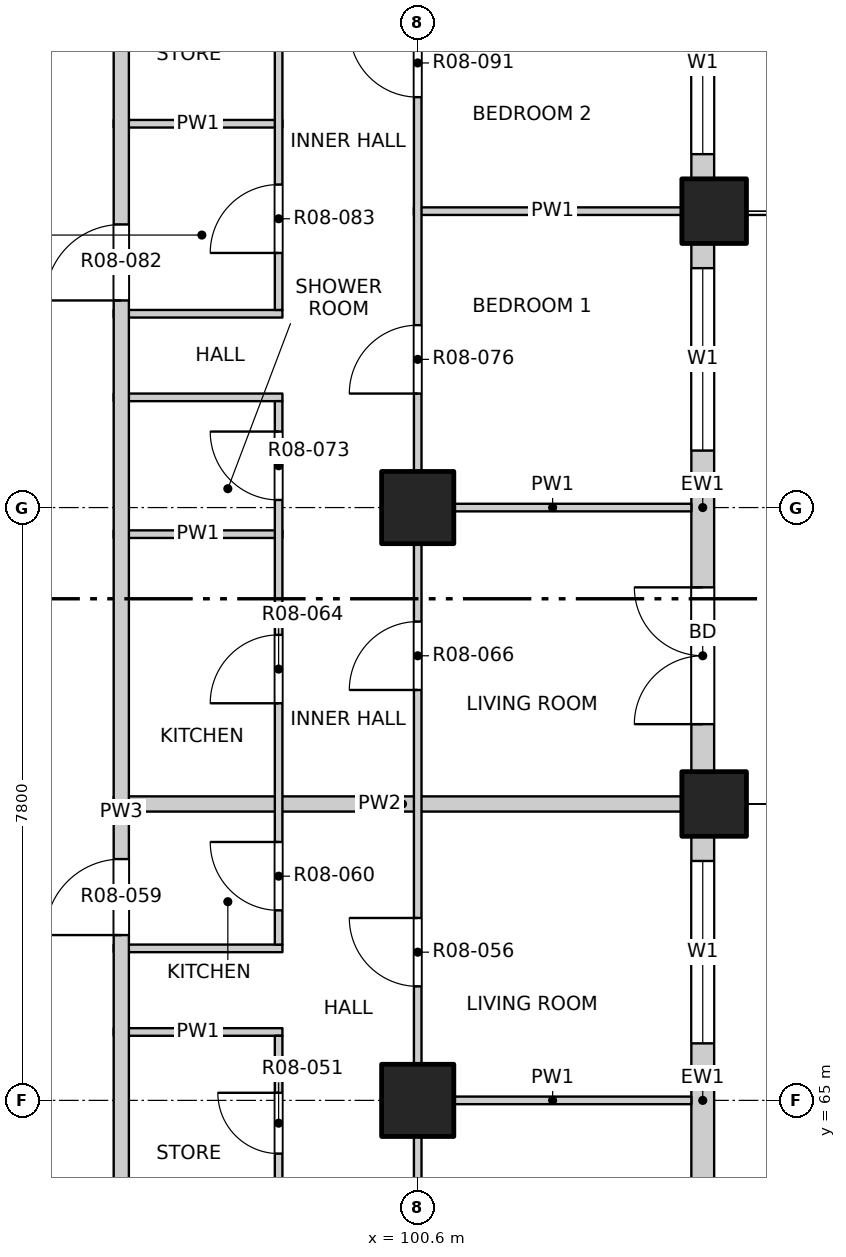
"""IFC4 building model, lengths in metres.
Left out: names, types, materials, properties, quantities, classifications, styles, units other than length and angle.
Written with IfcOpenShell. Run it as: python <this file> out.ifc"""

import sys

from ifc_helpers import new_model, si_unit, direction, frame, frame_2d, origin, origin_2d, place, context, subcontext, project, spatial, rectangle, extrude, element, fill, save


model = new_model("IFC4")
c1 = context("Model", 3, precision=1e-05, world=origin(), true_north=direction((0.0, 1.0)))
c2 = subcontext(c1, "Body", "Model", "MODEL_VIEW")
j1 = project(units=[si_unit("LENGTHUNIT", "METRE"), si_unit("PLANEANGLEUNIT", "RADIAN")], contexts=[c1])
p1 = place(None, origin())
s1 = spatial("IfcSite", under=j1, at=p1, CompositionType="ELEMENT")
p2 = place(p1, origin())
s2 = spatial("IfcBuilding", under=s1, at=p2, CompositionType="ELEMENT")
p3 = place(p2, frame((0.0, 0.0, 99.9)))
s3 = spatial("IfcBuildingStorey", under=s2, at=p3, CompositionType="ELEMENT", Elevation=99.9)
for number, where, z_axis, x_axis in (
    (1, (104.5, 68.9, -0.3), (0.0, 0.0, 1.0), (1.0, 0.0, 0.0)),
    (2, (104.5, 76.7, -0.3), (0.0, 0.0, 1.0), (1.0, 0.0, 0.0)),
):
    element("IfcColumn", number, at=place(p3, frame(where, z_axis=z_axis, x_axis=x_axis)), inside=s3, PredefinedType="COLUMN", context=c2, shape_type="SweptSolid", body=[
        extrude(rectangle(XDim=0.85, YDim=0.85, at=origin_2d()), origin(), (0.0, 0.0, 1.0), 3.45),
    ])
for number, where, z_axis, x_axis in (
    (3, (100.6, 65.0, -0.3), (0.0, 0.0, 1.0), (1.0, 0.0, 0.0)),
    (4, (100.6, 72.8, -0.3), (0.0, 0.0, 1.0), (1.0, 0.0, 0.0)),
):
    element("IfcColumn", number, at=place(p3, frame(where, z_axis=z_axis, x_axis=x_axis)), inside=s3, PredefinedType="COLUMN", context=c2, shape_type="SweptSolid", body=[
        extrude(rectangle(XDim=0.95, YDim=0.95, at=origin_2d()), origin(), (0.0, 0.0, 1.0), 3.45),
    ])
p4 = place(p3, frame((104.35, 61.525, 0.0), z_axis=(0.0, 0.0, 1.0), x_axis=(0.0, 1.0, 0.0)))
e5 = element("IfcWall", 5, at=p4, inside=s3, PredefinedType="SOLIDWALL", context=c2, shape_type="SweptSolid", body=[
    extrude(rectangle(XDim=6.95, YDim=0.3, at=frame_2d((3.475, 0.0))), origin(), (0.0, 0.0, 1.0), 2.7),
])
p5 = place(p4, frame((0.625, 0.0, 0.0)))
e6 = element("IfcOpeningElement", 6, at=p5, cuts=e5, PredefinedType="OPENING", context=c2, shape_type="SweptSolid", body=[
    extrude(rectangle(XDim=1.8, YDim=2.4, at=frame_2d((0.9, 1.2))), frame((0.0, 0.16, 0.0), z_axis=(0.0, -1.0, 0.0), x_axis=(1.0, 0.0, 0.0)), (0.0, 0.0, 1.0), 0.32),
])
p6 = place(p4, frame((4.225, 0.0, 0.9)))
e7 = element("IfcOpeningElement", 7, at=p6, cuts=e5, PredefinedType="OPENING", context=c2, shape_type="SweptSolid", body=[
    extrude(rectangle(XDim=2.4, YDim=1.8, at=frame_2d((1.2, 0.9))), frame((0.0, 0.16, 0.0), z_axis=(0.0, -1.0, 0.0), x_axis=(1.0, 0.0, 0.0)), (0.0, 0.0, 1.0), 0.32),
])
p7 = place(p3, frame((104.35, 69.325, 0.0), z_axis=(0.0, 0.0, 1.0), x_axis=(0.0, 1.0, 0.0)))
e8 = element("IfcWall", 8, at=p7, inside=s3, PredefinedType="SOLIDWALL", context=c2, shape_type="SweptSolid", body=[
    extrude(rectangle(XDim=6.95, YDim=0.3, at=frame_2d((3.475, 0.0))), origin(), (0.0, 0.0, 1.0), 2.7),
])
p8 = place(p7, frame((0.625, 0.0, 0.0)))
e9 = element("IfcOpeningElement", 9, at=p8, cuts=e8, PredefinedType="OPENING", context=c2, shape_type="SweptSolid", body=[
    extrude(rectangle(XDim=1.8, YDim=2.4, at=frame_2d((0.9, 1.2))), frame((0.0, 0.16, 0.0), z_axis=(0.0, -1.0, 0.0), x_axis=(1.0, 0.0, 0.0)), (0.0, 0.0, 1.0), 0.32),
])
p9 = place(p7, frame((4.225, 0.0, 0.9)))
e10 = element("IfcOpeningElement", 10, at=p9, cuts=e8, PredefinedType="OPENING", context=c2, shape_type="SweptSolid", body=[
    extrude(rectangle(XDim=2.4, YDim=1.8, at=frame_2d((1.2, 0.9))), frame((0.0, 0.16, 0.0), z_axis=(0.0, -1.0, 0.0), x_axis=(1.0, 0.0, 0.0)), (0.0, 0.0, 1.0), 0.32),
])
p10 = place(p3, frame((104.35, 77.125, 0.0), z_axis=(0.0, 0.0, 1.0), x_axis=(0.0, 1.0, 0.0)))
e11 = element("IfcWall", 11, at=p10, inside=s3, PredefinedType="SOLIDWALL", context=c2, shape_type="SweptSolid", body=[
    extrude(rectangle(XDim=3.475, YDim=0.3, at=frame_2d((1.738, 0.0))), origin(), (0.0, 0.0, 1.0), 2.7),
])
p11 = place(p10, frame((0.325, 0.0, 0.9)))
e12 = element("IfcOpeningElement", 12, at=p11, cuts=e11, PredefinedType="OPENING", context=c2, shape_type="SweptSolid", body=[
    extrude(rectangle(XDim=2.4, YDim=1.8, at=frame_2d((1.2, 0.9))), frame((0.0, 0.16, 0.0), z_axis=(0.0, -1.0, 0.0), x_axis=(1.0, 0.0, 0.0)), (0.0, 0.0, 1.0), 0.32),
])
p12 = place(p3, frame((100.55, 65.0, 0.0), z_axis=(0.0, 0.0, 1.0), x_axis=(1.0, 0.0, 0.0)))
e13 = element("IfcWall", 13, at=p12, inside=s3, PredefinedType="PARTITIONING", context=c2, shape_type="SweptSolid", body=[
    extrude(rectangle(XDim=3.65, YDim=0.1, at=frame_2d((1.825, 0.0))), origin(), (0.0, 0.0, 1.0), 3.15),
])
for number, where, z_axis, x_axis in (
    (14, (96.6, 65.9, 0.0), (0.0, 0.0, 1.0), (1.0, 0.0, 0.0)),
    (15, (96.6, 67.0, 0.0), (0.0, 0.0, 1.0), (1.0, 0.0, 0.0)),
):
    element("IfcWall", number, at=place(p3, frame(where, z_axis=z_axis, x_axis=x_axis)), inside=s3, PredefinedType="PARTITIONING", context=c2, shape_type="SweptSolid", body=[
        extrude(rectangle(XDim=2.22, YDim=0.1, at=frame_2d((1.11, 0.0))), origin(), (0.0, 0.0, 1.0), 3.15),
    ])
p13 = place(p3, frame((96.6, 68.9, 0.0), z_axis=(0.0, 0.0, 1.0), x_axis=(1.0, 0.0, 0.0)))
e16 = element("IfcWall", 16, at=p13, inside=s3, PredefinedType="PARTITIONING", context=c2, shape_type="SweptSolid", body=[
    extrude(rectangle(XDim=7.6, YDim=0.2, at=frame_2d((3.8, 0.0))), origin(), (0.0, 0.0, 1.0), 2.55),
])
p14 = place(p3, frame((96.6, 72.45, 0.0), z_axis=(0.0, 0.0, 1.0), x_axis=(1.0, 0.0, 0.0)))
e17 = element("IfcWall", 17, at=p14, inside=s3, PredefinedType="PARTITIONING", context=c2, shape_type="SweptSolid", body=[
    extrude(rectangle(XDim=2.22, YDim=0.1, at=frame_2d((1.11, 0.0))), origin(), (0.0, 0.0, 1.0), 3.15),
])
p15 = place(p3, frame((100.55, 72.8, 0.0), z_axis=(0.0, 0.0, 1.0), x_axis=(1.0, 0.0, 0.0)))
e18 = element("IfcWall", 18, at=p15, inside=s3, PredefinedType="PARTITIONING", context=c2, shape_type="SweptSolid", body=[
    extrude(rectangle(XDim=3.65, YDim=0.1, at=frame_2d((1.825, 0.0))), origin(), (0.0, 0.0, 1.0), 3.15),
])
for number, where, z_axis, x_axis in (
    (19, (96.6, 74.25, 0.0), (0.0, 0.0, 1.0), (1.0, 0.0, 0.0)),
    (20, (96.6, 75.35, 0.0), (0.0, 0.0, 1.0), (1.0, 0.0, 0.0)),
):
    element("IfcWall", number, at=place(p3, frame(where, z_axis=z_axis, x_axis=x_axis)), inside=s3, PredefinedType="PARTITIONING", context=c2, shape_type="SweptSolid", body=[
        extrude(rectangle(XDim=2.22, YDim=0.1, at=frame_2d((1.11, 0.0))), origin(), (0.0, 0.0, 1.0), 3.15),
    ])
p16 = place(p3, frame((100.55, 76.7, 0.0), z_axis=(0.0, 0.0, 1.0), x_axis=(1.0, 0.0, 0.0)))
e21 = element("IfcWall", 21, at=p16, inside=s3, PredefinedType="PARTITIONING", context=c2, shape_type="SweptSolid", body=[
    extrude(rectangle(XDim=3.65, YDim=0.1, at=frame_2d((1.825, 0.0))), origin(), (0.0, 0.0, 1.0), 2.55),
])
p17 = place(p3, frame((96.6, 77.85, 0.0), z_axis=(0.0, 0.0, 1.0), x_axis=(1.0, 0.0, 0.0)))
e22 = element("IfcWall", 22, at=p17, inside=s3, PredefinedType="PARTITIONING", context=c2, shape_type="SweptSolid", body=[
    extrude(rectangle(XDim=2.22, YDim=0.1, at=frame_2d((1.11, 0.0))), origin(), (0.0, 0.0, 1.0), 3.15),
])
p18 = place(p3, frame((96.7, 53.4, 0.0), z_axis=(0.0, 0.0, 1.0), x_axis=(0.0, 1.0, 0.0)))
e23 = element("IfcWall", 23, at=p18, inside=s3, PredefinedType="PARTITIONING", context=c2, shape_type="SweptSolid", body=[
    extrude(rectangle(XDim=30.8, YDim=0.2, at=frame_2d((15.4, 0.0))), origin(), (0.0, 0.0, 1.0), 3.15),
])
p19 = place(p18, frame((5.525, 0.0, 0.0)))
e24 = element("IfcOpeningElement", 24, at=p19, cuts=e23, PredefinedType="OPENING", context=c2, shape_type="SweptSolid", body=[
    extrude(rectangle(XDim=1.0, YDim=2.1, at=frame_2d((0.5, 1.05))), frame((0.0, 0.11, 0.0), z_axis=(0.0, -1.0, 0.0), x_axis=(1.0, 0.0, 0.0)), (0.0, 0.0, 1.0), 0.22),
])
p20 = place(p18, frame((13.775, 0.0, 0.0)))
e25 = element("IfcOpeningElement", 25, at=p20, cuts=e23, PredefinedType="OPENING", context=c2, shape_type="SweptSolid", body=[
    extrude(rectangle(XDim=1.0, YDim=2.1, at=frame_2d((0.5, 1.05))), frame((0.0, 0.11, 0.0), z_axis=(0.0, -1.0, 0.0), x_axis=(1.0, 0.0, 0.0)), (0.0, 0.0, 1.0), 0.22),
])
p21 = place(p18, frame((22.125, 0.0, 0.0)))
e26 = element("IfcOpeningElement", 26, at=p21, cuts=e23, PredefinedType="OPENING", context=c2, shape_type="SweptSolid", body=[
    extrude(rectangle(XDim=1.0, YDim=2.1, at=frame_2d((0.5, 1.05))), frame((0.0, 0.11, 0.0), z_axis=(0.0, -1.0, 0.0), x_axis=(1.0, 0.0, 0.0)), (0.0, 0.0, 1.0), 0.22),
])
p22 = place(p3, frame((98.77, 58.8, 0.0), z_axis=(0.0, 0.0, 1.0), x_axis=(0.0, 1.0, 0.0)))
e27 = element("IfcWall", 27, at=p22, inside=s3, PredefinedType="PARTITIONING", context=c2, shape_type="SweptSolid", body=[
    extrude(rectangle(XDim=7.05, YDim=0.1, at=frame_2d((3.525, 0.0))), origin(), (0.0, 0.0, 1.0), 3.15),
])
p23 = place(p22, frame((0.675, 0.0, 0.0)))
e28 = element("IfcOpeningElement", 28, at=p23, cuts=e27, PredefinedType="OPENING", context=c2, shape_type="SweptSolid", body=[
    extrude(rectangle(XDim=0.9, YDim=2.1, at=frame_2d((0.45, 1.05))), frame((0.0, 0.06, 0.0), z_axis=(0.0, -1.0, 0.0), x_axis=(1.0, 0.0, 0.0)), (0.0, 0.0, 1.0), 0.12),
])
p24 = place(p22, frame((3.05, 0.0, 0.0)))
e29 = element("IfcOpeningElement", 29, at=p24, cuts=e27, PredefinedType="OPENING", context=c2, shape_type="SweptSolid", body=[
    extrude(rectangle(XDim=0.9, YDim=2.1, at=frame_2d((0.45, 1.05))), frame((0.0, 0.06, 0.0), z_axis=(0.0, -1.0, 0.0), x_axis=(1.0, 0.0, 0.0)), (0.0, 0.0, 1.0), 0.12),
])
p25 = place(p22, frame((5.5, 0.0, 0.0)))
e30 = element("IfcOpeningElement", 30, at=p25, cuts=e27, PredefinedType="OPENING", context=c2, shape_type="SweptSolid", body=[
    extrude(rectangle(XDim=0.8, YDim=2.1, at=frame_2d((0.4, 1.05))), frame((0.0, 0.06, 0.0), z_axis=(0.0, -1.0, 0.0), x_axis=(1.0, 0.0, 0.0)), (0.0, 0.0, 1.0), 0.12),
])
p26 = place(p3, frame((98.77, 67.05, 0.0), z_axis=(0.0, 0.0, 1.0), x_axis=(0.0, 1.0, 0.0)))
e31 = element("IfcWall", 31, at=p26, inside=s3, PredefinedType="PARTITIONING", context=c2, shape_type="SweptSolid", body=[
    extrude(rectangle(XDim=7.15, YDim=0.1, at=frame_2d((3.575, 0.0))), origin(), (0.0, 0.0, 1.0), 3.15),
])
p27 = place(p26, frame((0.45, 0.0, 0.0)))
e32 = element("IfcOpeningElement", 32, at=p27, cuts=e31, PredefinedType="OPENING", context=c2, shape_type="SweptSolid", body=[
    extrude(rectangle(XDim=0.9, YDim=2.1, at=frame_2d((0.45, 1.05))), frame((0.0, 0.06, 0.0), z_axis=(0.0, -1.0, 0.0), x_axis=(1.0, 0.0, 0.0)), (0.0, 0.0, 1.0), 0.12),
])
p28 = place(p26, frame((3.175, 0.0, 0.0)))
e33 = element("IfcOpeningElement", 33, at=p28, cuts=e31, PredefinedType="OPENING", context=c2, shape_type="SweptSolid", body=[
    extrude(rectangle(XDim=0.9, YDim=2.1, at=frame_2d((0.45, 1.05))), frame((0.0, 0.06, 0.0), z_axis=(0.0, -1.0, 0.0), x_axis=(1.0, 0.0, 0.0)), (0.0, 0.0, 1.0), 0.12),
])
p29 = place(p26, frame((5.85, 0.0, 0.0)))
e34 = element("IfcOpeningElement", 34, at=p29, cuts=e31, PredefinedType="OPENING", context=c2, shape_type="SweptSolid", body=[
    extrude(rectangle(XDim=0.9, YDim=2.1, at=frame_2d((0.45, 1.05))), frame((0.0, 0.06, 0.0), z_axis=(0.0, -1.0, 0.0), x_axis=(1.0, 0.0, 0.0)), (0.0, 0.0, 1.0), 0.12),
])
p30 = place(p3, frame((98.77, 75.4, 0.0), z_axis=(0.0, 0.0, 1.0), x_axis=(0.0, 1.0, 0.0)))
e35 = element("IfcWall", 35, at=p30, inside=s3, PredefinedType="PARTITIONING", context=c2, shape_type="SweptSolid", body=[
    extrude(rectangle(XDim=5.15, YDim=0.1, at=frame_2d((2.575, 0.0))), origin(), (0.0, 0.0, 1.0), 3.15),
])
p31 = place(p30, frame((0.75, 0.0, 0.0)))
e36 = element("IfcOpeningElement", 36, at=p31, cuts=e35, PredefinedType="OPENING", context=c2, shape_type="SweptSolid", body=[
    extrude(rectangle(XDim=0.9, YDim=2.1, at=frame_2d((0.45, 1.05))), frame((0.0, 0.06, 0.0), z_axis=(0.0, -1.0, 0.0), x_axis=(1.0, 0.0, 0.0)), (0.0, 0.0, 1.0), 0.12),
])
p32 = place(p30, frame((3.425, 0.0, 0.0)))
e37 = element("IfcOpeningElement", 37, at=p32, cuts=e35, PredefinedType="OPENING", context=c2, shape_type="SweptSolid", body=[
    extrude(rectangle(XDim=0.8, YDim=2.1, at=frame_2d((0.4, 1.05))), frame((0.0, 0.06, 0.0), z_axis=(0.0, -1.0, 0.0), x_axis=(1.0, 0.0, 0.0)), (0.0, 0.0, 1.0), 0.12),
])
p33 = place(p3, frame((100.6, 45.8, 0.0), z_axis=(0.0, 0.0, 1.0), x_axis=(0.0, 1.0, 0.0)))
e38 = element("IfcWall", 38, at=p33, inside=s3, PredefinedType="PARTITIONING", context=c2, shape_type="SweptSolid", body=[
    extrude(rectangle(XDim=38.4, YDim=0.1, at=frame_2d((19.2, 0.0))), origin(), (0.0, 0.0, 1.0), 3.15),
])
p34 = place(p33, frame((1.05, 0.0, 0.0)))
e39 = element("IfcOpeningElement", 39, at=p34, cuts=e38, PredefinedType="OPENING", context=c2, shape_type="SweptSolid", body=[
    extrude(rectangle(XDim=1.2, YDim=2.1, at=frame_2d((0.6, 1.05))), frame((0.0, 0.06, 0.0), z_axis=(0.0, -1.0, 0.0), x_axis=(1.0, 0.0, 0.0)), (0.0, 0.0, 1.0), 0.12),
])
p35 = place(p33, frame((5.1, 0.0, 0.0)))
e40 = element("IfcOpeningElement", 40, at=p35, cuts=e38, PredefinedType="OPENING", context=c2, shape_type="SweptSolid", body=[
    extrude(rectangle(XDim=0.9, YDim=2.1, at=frame_2d((0.45, 1.05))), frame((0.0, 0.06, 0.0), z_axis=(0.0, -1.0, 0.0), x_axis=(1.0, 0.0, 0.0)), (0.0, 0.0, 1.0), 0.12),
])
p36 = place(p33, frame((9.0, 0.0, 0.0)))
e41 = element("IfcOpeningElement", 41, at=p36, cuts=e38, PredefinedType="OPENING", context=c2, shape_type="SweptSolid", body=[
    extrude(rectangle(XDim=0.9, YDim=2.1, at=frame_2d((0.45, 1.05))), frame((0.0, 0.06, 0.0), z_axis=(0.0, -1.0, 0.0), x_axis=(1.0, 0.0, 0.0)), (0.0, 0.0, 1.0), 0.12),
])
p37 = place(p33, frame((12.9, 0.0, 0.0)))
e42 = element("IfcOpeningElement", 42, at=p37, cuts=e38, PredefinedType="OPENING", context=c2, shape_type="SweptSolid", body=[
    extrude(rectangle(XDim=0.9, YDim=2.1, at=frame_2d((0.45, 1.05))), frame((0.0, 0.06, 0.0), z_axis=(0.0, -1.0, 0.0), x_axis=(1.0, 0.0, 0.0)), (0.0, 0.0, 1.0), 0.12),
])
p38 = place(p33, frame((16.8, 0.0, 0.0)))
e43 = element("IfcOpeningElement", 43, at=p38, cuts=e38, PredefinedType="OPENING", context=c2, shape_type="SweptSolid", body=[
    extrude(rectangle(XDim=0.9, YDim=2.1, at=frame_2d((0.45, 1.05))), frame((0.0, 0.06, 0.0), z_axis=(0.0, -1.0, 0.0), x_axis=(1.0, 0.0, 0.0)), (0.0, 0.0, 1.0), 0.12),
])
p39 = place(p33, frame((20.7, 0.0, 0.0)))
e44 = element("IfcOpeningElement", 44, at=p39, cuts=e38, PredefinedType="OPENING", context=c2, shape_type="SweptSolid", body=[
    extrude(rectangle(XDim=0.9, YDim=2.1, at=frame_2d((0.45, 1.05))), frame((0.0, 0.06, 0.0), z_axis=(0.0, -1.0, 0.0), x_axis=(1.0, 0.0, 0.0)), (0.0, 0.0, 1.0), 0.12),
])
p40 = place(p33, frame((24.6, 0.0, 0.0)))
e45 = element("IfcOpeningElement", 45, at=p40, cuts=e38, PredefinedType="OPENING", context=c2, shape_type="SweptSolid", body=[
    extrude(rectangle(XDim=0.9, YDim=2.1, at=frame_2d((0.45, 1.05))), frame((0.0, 0.06, 0.0), z_axis=(0.0, -1.0, 0.0), x_axis=(1.0, 0.0, 0.0)), (0.0, 0.0, 1.0), 0.12),
])
p41 = place(p33, frame((28.5, 0.0, 0.0)))
e46 = element("IfcOpeningElement", 46, at=p41, cuts=e38, PredefinedType="OPENING", context=c2, shape_type="SweptSolid", body=[
    extrude(rectangle(XDim=0.9, YDim=2.1, at=frame_2d((0.45, 1.05))), frame((0.0, 0.06, 0.0), z_axis=(0.0, -1.0, 0.0), x_axis=(1.0, 0.0, 0.0)), (0.0, 0.0, 1.0), 0.12),
])
p42 = place(p33, frame((32.4, 0.0, 0.0)))
e47 = element("IfcOpeningElement", 47, at=p42, cuts=e38, PredefinedType="OPENING", context=c2, shape_type="SweptSolid", body=[
    extrude(rectangle(XDim=0.9, YDim=2.1, at=frame_2d((0.45, 1.05))), frame((0.0, 0.06, 0.0), z_axis=(0.0, -1.0, 0.0), x_axis=(1.0, 0.0, 0.0)), (0.0, 0.0, 1.0), 0.12),
])
p43 = place(p33, frame((36.15, 0.0, 0.0)))
e48 = element("IfcOpeningElement", 48, at=p43, cuts=e38, PredefinedType="OPENING", context=c2, shape_type="SweptSolid", body=[
    extrude(rectangle(XDim=1.2, YDim=2.1, at=frame_2d((0.6, 1.05))), frame((0.0, 0.06, 0.0), z_axis=(0.0, -1.0, 0.0), x_axis=(1.0, 0.0, 0.0)), (0.0, 0.0, 1.0), 0.12),
])
p44 = place(p6, origin())
e49 = element("IfcWindow", 49, at=p44, inside=s3, PartitioningType="DOUBLE_PANEL_VERTICAL", PredefinedType="WINDOW", context=c2, shape_type="SweptSolid", body=[
    extrude(rectangle(XDim=2.4, YDim=1.8, at=frame_2d((1.2, 0.9))), frame((0.0, 0.03, 0.0), z_axis=(0.0, -1.0, 0.0), x_axis=(1.0, 0.0, 0.0)), (0.0, 0.0, 1.0), 0.06),
])
fill(e7, e49)
p45 = place(p8, origin())
e50 = element("IfcDoor", 50, at=p45, inside=s3, OperationType="DOUBLE_DOOR_SINGLE_SWING", PredefinedType="DOOR", context=c2, shape_type="SweptSolid", body=[
    extrude(rectangle(XDim=1.8, YDim=2.4, at=frame_2d((0.9, 1.2))), frame((0.0, 0.025, 0.0), z_axis=(0.0, -1.0, 0.0), x_axis=(1.0, 0.0, 0.0)), (0.0, 0.0, 1.0), 0.05),
])
fill(e9, e50)
p46 = place(p9, origin())
e51 = element("IfcWindow", 51, at=p46, inside=s3, PartitioningType="DOUBLE_PANEL_VERTICAL", PredefinedType="WINDOW", context=c2, shape_type="SweptSolid", body=[
    extrude(rectangle(XDim=2.4, YDim=1.8, at=frame_2d((1.2, 0.9))), frame((0.0, 0.03, 0.0), z_axis=(0.0, -1.0, 0.0), x_axis=(1.0, 0.0, 0.0)), (0.0, 0.0, 1.0), 0.06),
])
fill(e10, e51)
p47 = place(p11, origin())
e52 = element("IfcWindow", 52, at=p47, inside=s3, PartitioningType="DOUBLE_PANEL_VERTICAL", PredefinedType="WINDOW", context=c2, shape_type="SweptSolid", body=[
    extrude(rectangle(XDim=2.4, YDim=1.8, at=frame_2d((1.2, 0.9))), frame((0.0, 0.03, 0.0), z_axis=(0.0, -1.0, 0.0), x_axis=(1.0, 0.0, 0.0)), (0.0, 0.0, 1.0), 0.06),
])
fill(e12, e52)
p48 = place(p25, origin())
e53 = element("IfcDoor", 53, at=p48, inside=s3, OperationType="SINGLE_SWING_RIGHT", PredefinedType="DOOR", context=c2, shape_type="SweptSolid", body=[
    extrude(rectangle(XDim=0.8, YDim=2.1, at=frame_2d((0.4, 1.05))), frame((0.0, 0.025, 0.0), z_axis=(0.0, -1.0, 0.0), x_axis=(1.0, 0.0, 0.0)), (0.0, 0.0, 1.0), 0.05),
])
fill(e30, e53)
p49 = place(p39, origin())
e54 = element("IfcDoor", 54, at=p49, inside=s3, OperationType="SINGLE_SWING_RIGHT", PredefinedType="DOOR", context=c2, shape_type="SweptSolid", body=[
    extrude(rectangle(XDim=0.9, YDim=2.1, at=frame_2d((0.45, 1.05))), frame((0.0, 0.025, 0.0), z_axis=(0.0, -1.0, 0.0), x_axis=(1.0, 0.0, 0.0)), (0.0, 0.0, 1.0), 0.05),
])
fill(e44, e54)
p50 = place(p20, origin())
e55 = element("IfcDoor", 55, at=p50, inside=s3, OperationType="SINGLE_SWING_LEFT", PredefinedType="DOOR", context=c2, shape_type="SweptSolid", body=[
    extrude(rectangle(XDim=1.0, YDim=2.1, at=frame_2d((0.5, 1.05))), frame((0.0, 0.025, 0.0), z_axis=(0.0, -1.0, 0.0), x_axis=(1.0, 0.0, 0.0)), (0.0, 0.0, 1.0), 0.05),
])
fill(e25, e55)
p51 = place(p27, origin())
e56 = element("IfcDoor", 56, at=p51, inside=s3, OperationType="SINGLE_SWING_RIGHT", PredefinedType="DOOR", context=c2, shape_type="SweptSolid", body=[
    extrude(rectangle(XDim=0.9, YDim=2.1, at=frame_2d((0.45, 1.05))), frame((0.0, 0.025, 0.0), z_axis=(0.0, -1.0, 0.0), x_axis=(1.0, 0.0, 0.0)), (0.0, 0.0, 1.0), 0.05),
])
fill(e32, e56)
p52 = place(p28, origin())
e57 = element("IfcDoor", 57, at=p52, inside=s3, OperationType="SINGLE_SWING_LEFT", PredefinedType="DOOR", context=c2, shape_type="SweptSolid", body=[
    extrude(rectangle(XDim=0.9, YDim=2.1, at=frame_2d((0.45, 1.05))), frame((0.0, 0.025, 0.0), z_axis=(0.0, -1.0, 0.0), x_axis=(1.0, 0.0, 0.0)), (0.0, 0.0, 1.0), 0.05),
])
fill(e33, e57)
p53 = place(p40, origin())
e58 = element("IfcDoor", 58, at=p53, inside=s3, OperationType="SINGLE_SWING_LEFT", PredefinedType="DOOR", context=c2, shape_type="SweptSolid", body=[
    extrude(rectangle(XDim=0.9, YDim=2.1, at=frame_2d((0.45, 1.05))), frame((0.0, 0.025, 0.0), z_axis=(0.0, -1.0, 0.0), x_axis=(1.0, 0.0, 0.0)), (0.0, 0.0, 1.0), 0.05),
])
fill(e45, e58)
p54 = place(p29, origin())
e59 = element("IfcDoor", 59, at=p54, inside=s3, OperationType="SINGLE_SWING_RIGHT", PredefinedType="DOOR", context=c2, shape_type="SweptSolid", body=[
    extrude(rectangle(XDim=0.9, YDim=2.1, at=frame_2d((0.45, 1.05))), frame((0.0, 0.025, 0.0), z_axis=(0.0, -1.0, 0.0), x_axis=(1.0, 0.0, 0.0)), (0.0, 0.0, 1.0), 0.05),
])
fill(e34, e59)
p55 = place(p41, origin())
e60 = element("IfcDoor", 60, at=p55, inside=s3, OperationType="SINGLE_SWING_LEFT", PredefinedType="DOOR", context=c2, shape_type="SweptSolid", body=[
    extrude(rectangle(XDim=0.9, YDim=2.1, at=frame_2d((0.45, 1.05))), frame((0.0, 0.025, 0.0), z_axis=(0.0, -1.0, 0.0), x_axis=(1.0, 0.0, 0.0)), (0.0, 0.0, 1.0), 0.05),
])
fill(e46, e60)
p56 = place(p21, origin())
e61 = element("IfcDoor", 61, at=p56, inside=s3, OperationType="SINGLE_SWING_LEFT", PredefinedType="DOOR", context=c2, shape_type="SweptSolid", body=[
    extrude(rectangle(XDim=1.0, YDim=2.1, at=frame_2d((0.5, 1.05))), frame((0.0, 0.025, 0.0), z_axis=(0.0, -1.0, 0.0), x_axis=(1.0, 0.0, 0.0)), (0.0, 0.0, 1.0), 0.05),
])
fill(e26, e61)
p57 = place(p31, origin())
e62 = element("IfcDoor", 62, at=p57, inside=s3, OperationType="SINGLE_SWING_LEFT", PredefinedType="DOOR", context=c2, shape_type="SweptSolid", body=[
    extrude(rectangle(XDim=0.9, YDim=2.1, at=frame_2d((0.45, 1.05))), frame((0.0, 0.025, 0.0), z_axis=(0.0, -1.0, 0.0), x_axis=(1.0, 0.0, 0.0)), (0.0, 0.0, 1.0), 0.05),
])
fill(e36, e62)
p58 = place(p42, origin())
e63 = element("IfcDoor", 63, at=p58, inside=s3, OperationType="SINGLE_SWING_RIGHT", PredefinedType="DOOR", context=c2, shape_type="SweptSolid", body=[
    extrude(rectangle(XDim=0.9, YDim=2.1, at=frame_2d((0.45, 1.05))), frame((0.0, 0.025, 0.0), z_axis=(0.0, -1.0, 0.0), x_axis=(1.0, 0.0, 0.0)), (0.0, 0.0, 1.0), 0.05),
])
fill(e47, e63)
save(model, sys.argv[1])
